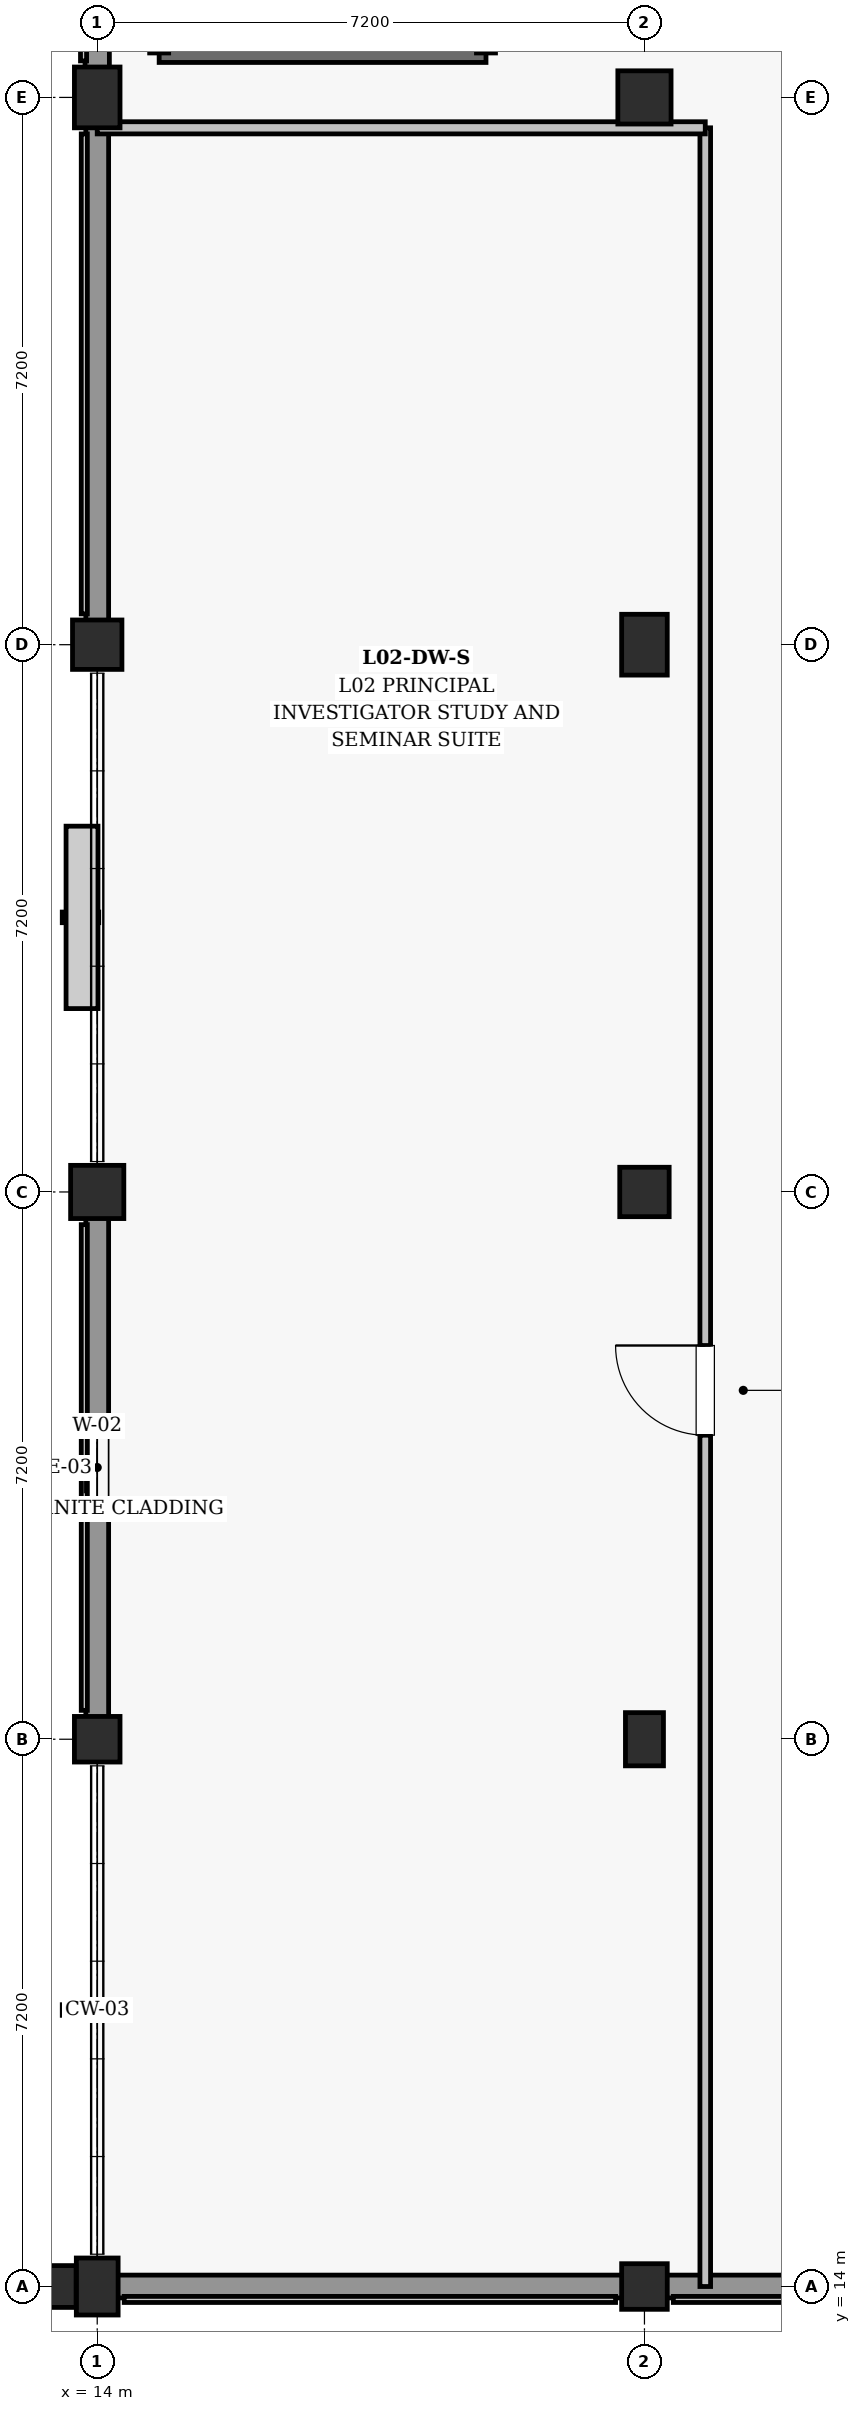
"""IFC4 building model, lengths in metres.
Left out: names, types, materials, properties, quantities, classifications, styles, units other than length and angle.
Written with IfcOpenShell. Run it as: python <this file> out.ifc"""

import sys

from ifc_helpers import new_model, si_unit, direction, frame, frame_2d, origin, origin_2d, place, context, subcontext, project, spatial, rectangle, extrude, element, fill, save


model = new_model("IFC4")
c1 = context("Model", 3, precision=1e-05, world=origin(), true_north=direction((0.0, 1.0)))
c2 = subcontext(c1, "Body", "Model", "MODEL_VIEW")
j1 = project(units=[si_unit("LENGTHUNIT", "METRE"), si_unit("PLANEANGLEUNIT", "RADIAN")], contexts=[c1])
p1 = place(None, origin())
s1 = spatial("IfcSite", under=j1, at=p1, CompositionType="ELEMENT")
p2 = place(p1, origin())
s2 = spatial("IfcBuilding", under=s1, at=p2, CompositionType="ELEMENT")
p3 = place(p2, frame((0.0, 0.0, 9.9)))
s3 = spatial("IfcBuildingStorey", under=s2, at=p3, CompositionType="ELEMENT", Elevation=9.9)
p4 = place(p3, frame((14.0, 14.0, 0.0), z_axis=(0.0, 0.0, 1.0), x_axis=(1.0, 0.0, 0.0)))
e1 = element("IfcColumn", 1, at=p4, inside=s3, PredefinedType="COLUMN", context=c2, shape_type="SweptSolid", body=[
    extrude(rectangle(XDim=0.55, YDim=0.75, at=origin_2d()), origin(), (0.0, 0.0, 1.0), 4.5),
])
p5 = place(p3, frame((14.0, 21.2, 0.0), z_axis=(0.0, 0.0, 1.0), x_axis=(1.0, 0.0, 0.0)))
e2 = element("IfcColumn", 2, at=p5, inside=s3, PredefinedType="COLUMN", context=c2, shape_type="SweptSolid", body=[
    extrude(rectangle(XDim=0.6, YDim=0.6, at=origin_2d()), origin(), (0.0, 0.0, 1.0), 4.5),
])
p6 = place(p3, frame((14.0, 28.4, 0.0), z_axis=(0.0, 0.0, 1.0), x_axis=(1.0, 0.0, 0.0)))
e3 = element("IfcColumn", 3, at=p6, inside=s3, PredefinedType="COLUMN", context=c2, shape_type="SweptSolid", body=[
    extrude(rectangle(XDim=0.7, YDim=0.7, at=origin_2d()), origin(), (0.0, 0.0, 1.0), 4.5),
])
p7 = place(p3, frame((14.0, 35.6, 0.0), z_axis=(0.0, 0.0, 1.0), x_axis=(1.0, 0.0, 0.0)))
e4 = element("IfcColumn", 4, at=p7, inside=s3, PredefinedType="COLUMN", context=c2, shape_type="SweptSolid", body=[
    extrude(rectangle(XDim=0.65, YDim=0.65, at=origin_2d()), origin(), (0.0, 0.0, 1.0), 4.5),
])
p8 = place(p3, frame((14.0, 42.8, 0.0), z_axis=(0.0, 0.0, 1.0), x_axis=(1.0, 0.0, 0.0)))
e5 = element("IfcColumn", 5, at=p8, inside=s3, PredefinedType="COLUMN", context=c2, shape_type="SweptSolid", body=[
    extrude(rectangle(XDim=0.6, YDim=0.8, at=origin_2d()), origin(), (0.0, 0.0, 1.0), 4.5),
])
p9 = place(p3, frame((21.2, 14.0, 0.0), z_axis=(0.0, 0.0, 1.0), x_axis=(1.0, 0.0, 0.0)))
e6 = element("IfcColumn", 6, at=p9, inside=s3, PredefinedType="COLUMN", context=c2, shape_type="SweptSolid", body=[
    extrude(rectangle(XDim=0.6, YDim=0.6, at=origin_2d()), origin(), (0.0, 0.0, 1.0), 4.5),
])
p10 = place(p3, frame((21.2, 21.2, 0.0), z_axis=(0.0, 0.0, 1.0), x_axis=(1.0, 0.0, 0.0)))
e7 = element("IfcColumn", 7, at=p10, inside=s3, PredefinedType="COLUMN", context=c2, shape_type="SweptSolid", body=[
    extrude(rectangle(XDim=0.5, YDim=0.7, at=origin_2d()), origin(), (0.0, 0.0, 1.0), 4.5),
])
p11 = place(p3, frame((21.2, 28.4, 0.0), z_axis=(0.0, 0.0, 1.0), x_axis=(1.0, 0.0, 0.0)))
e8 = element("IfcColumn", 8, at=p11, inside=s3, PredefinedType="COLUMN", context=c2, shape_type="SweptSolid", body=[
    extrude(rectangle(XDim=0.65, YDim=0.65, at=origin_2d()), origin(), (0.0, 0.0, 1.0), 4.5),
])
p12 = place(p3, frame((21.2, 35.6, 0.0), z_axis=(0.0, 0.0, 1.0), x_axis=(1.0, 0.0, 0.0)))
e9 = element("IfcColumn", 9, at=p12, inside=s3, PredefinedType="COLUMN", context=c2, shape_type="SweptSolid", body=[
    extrude(rectangle(XDim=0.6, YDim=0.8, at=origin_2d()), origin(), (0.0, 0.0, 1.0), 4.5),
])
p13 = place(p3, frame((21.2, 42.8, 0.0), z_axis=(0.0, 0.0, 1.0), x_axis=(1.0, 0.0, 0.0)))
e10 = element("IfcColumn", 10, at=p13, inside=s3, PredefinedType="COLUMN", context=c2, shape_type="SweptSolid", body=[
    extrude(rectangle(XDim=0.7, YDim=0.7, at=origin_2d()), origin(), (0.0, 0.0, 1.0), 4.5),
])
p14 = place(p3, frame((13.322, 14.0, 0.0), z_axis=(0.0, 0.0, 1.0), x_axis=(0.0, 1.0, 0.0)))
e11 = element("IfcColumn", 11, at=p14, inside=s3, PredefinedType="PILASTER", context=c2, shape_type="SweptSolid", body=[
    extrude(rectangle(XDim=0.55, YDim=0.8, at=origin_2d()), origin(), (0.0, 0.0, 1.0), 4.5),
])
p15 = place(p3, frame((14.0, 21.48, 0.0), z_axis=(0.0, 0.0, 1.0), x_axis=(0.0, 1.0, 0.0)))
e12 = element("IfcWall", 12, at=p15, inside=s3, PredefinedType="SOLIDWALL", context=c2, shape_type="SweptSolid", body=[
    extrude(rectangle(XDim=6.59, YDim=0.3, at=frame_2d((3.295, 0.0))), origin(), (0.0, 0.0, 1.0), 3.455),
])
p16 = place(p15, frame((2.795, 0.0, 0.95)))
e13 = element("IfcOpeningElement", 13, at=p16, cuts=e12, PredefinedType="OPENING", context=c2, shape_type="SweptSolid", body=[
    extrude(rectangle(XDim=1.0, YDim=2.2, at=frame_2d((0.5, 1.1))), frame((0.0, 0.16, 0.0), z_axis=(0.0, -1.0, 0.0), x_axis=(1.0, 0.0, 0.0)), (0.0, 0.0, 1.0), 0.32),
])
p17 = place(p3, frame((14.0, 35.905, 0.0), z_axis=(0.0, 0.0, 1.0), x_axis=(0.0, 1.0, 0.0)))
e14 = element("IfcWall", 14, at=p17, inside=s3, PredefinedType="SOLIDWALL", context=c2, shape_type="SweptSolid", body=[
    extrude(rectangle(XDim=6.515, YDim=0.3, at=frame_2d((3.257, 0.0))), origin(), (0.0, 0.0, 1.0), 3.375),
])
p18 = place(p3, frame((14.0, 43.18, 0.0), z_axis=(0.0, 0.0, 1.0), x_axis=(0.0, 1.0, 0.0)))
e15 = element("IfcWall", 15, at=p18, inside=s3, PredefinedType="SOLIDWALL", context=c2, shape_type="SweptSolid", body=[
    extrude(rectangle(XDim=6.515, YDim=0.32, at=frame_2d((3.258, 0.0))), origin(), (0.0, 0.0, 1.0), 3.375),
])
p19 = place(p3, frame((14.255, 14.0, 0.0), z_axis=(0.0, 0.0, 1.0), x_axis=(1.0, 0.0, 0.0)))
e16 = element("IfcWall", 16, at=p19, inside=s3, PredefinedType="SOLIDWALL", context=c2, shape_type="SweptSolid", body=[
    extrude(rectangle(XDim=6.665, YDim=0.3, at=frame_2d((3.333, 0.0))), origin(), (0.0, 0.0, 1.0), 3.575),
])
p20 = place(p3, frame((21.48, 14.0, 0.0), z_axis=(0.0, 0.0, 1.0), x_axis=(1.0, 0.0, 0.0)))
e17 = element("IfcWall", 17, at=p20, inside=s3, PredefinedType="SOLIDWALL", context=c2, shape_type="SweptSolid", body=[
    extrude(rectangle(XDim=6.69, YDim=0.3, at=frame_2d((3.345, 0.0))), origin(), (0.0, 0.0, 1.0), 3.475),
])
p21 = place(p3, frame((14.815, 43.385, 0.0), z_axis=(0.0, 0.0, 1.0), x_axis=(1.0, 0.0, 0.0)))
e18 = element("IfcWall", 18, at=p21, inside=s3, PredefinedType="SHEAR", context=c2, shape_type="SweptSolid", body=[
    extrude(rectangle(XDim=4.3, YDim=0.25, at=frame_2d((2.15, 0.0))), origin(), (0.0, 0.0, 1.0), 4.195),
])
p22 = place(p3, frame((19.115, 43.385, 0.0), z_axis=(0.0, 0.0, 1.0), x_axis=(0.0, 1.0, 0.0)))
e19 = element("IfcWall", 19, at=p22, inside=s3, PredefinedType="SHEAR", context=c2, shape_type="SweptSolid", body=[
    extrude(rectangle(XDim=10.63, YDim=0.25, at=frame_2d((5.315, 0.0))), origin(), (0.0, 0.0, 1.0), 4.195),
])
p23 = place(p22, frame((0.55, 0.0, 0.0)))
e20 = element("IfcOpeningElement", 20, at=p23, cuts=e19, PredefinedType="OPENING", context=c2, shape_type="SweptSolid", body=[
    extrude(rectangle(XDim=1.2, YDim=2.15, at=frame_2d((0.6, 1.075))), frame((0.0, 0.135, 0.0), z_axis=(0.0, -1.0, 0.0), x_axis=(1.0, 0.0, 0.0)), (0.0, 0.0, 1.0), 0.27),
])
p24 = place(p3, frame((14.815, 54.015, 0.0), z_axis=(0.0, 0.0, 1.0), x_axis=(0.0, -1.0, 0.0)))
e21 = element("IfcWall", 21, at=p24, inside=s3, PredefinedType="SHEAR", context=c2, shape_type="SweptSolid", body=[
    extrude(rectangle(XDim=10.63, YDim=0.25, at=frame_2d((5.315, 0.0))), origin(), (0.0, 0.0, 1.0), 4.195),
])
p25 = place(p3, frame((22.0, 14.0, 0.0), z_axis=(0.0, 0.0, 1.0), x_axis=(0.0, 1.0, 0.0)))
e22 = element("IfcWall", 22, at=p25, inside=s3, PredefinedType="PARTITIONING", context=c2, shape_type="SweptSolid", body=[
    extrude(rectangle(XDim=28.4, YDim=0.14, at=frame_2d((14.2, 0.0))), origin(), (0.0, 0.0, 1.0), 3.48),
])
p26 = place(p25, frame((11.2, 0.0, 0.0)))
e23 = element("IfcOpeningElement", 23, at=p26, cuts=e22, PredefinedType="OPENING", context=c2, shape_type="SweptSolid", body=[
    extrude(rectangle(XDim=1.18, YDim=2.2, at=frame_2d((0.59, 1.1))), frame((0.0, 0.08, 0.0), z_axis=(0.0, -1.0, 0.0), x_axis=(1.0, 0.0, 0.0)), (0.0, 0.0, 1.0), 0.16),
])
p27 = place(p3, frame((14.0, 42.4, 0.0), z_axis=(0.0, 0.0, 1.0), x_axis=(1.0, 0.0, 0.0)))
e24 = element("IfcWall", 24, at=p27, inside=s3, PredefinedType="PARTITIONING", context=c2, shape_type="SweptSolid", body=[
    extrude(rectangle(XDim=8.0, YDim=0.16, at=frame_2d((4.0, 0.0))), origin(), (0.0, 0.0, 1.0), 3.58),
])
p28 = place(p16, origin())
e25 = element("IfcWindow", 25, at=p28, inside=s3, PartitioningType="SINGLE_PANEL", PredefinedType="WINDOW", context=c2, shape_type="SweptSolid", body=[
    extrude(rectangle(XDim=1.0, YDim=2.2, at=frame_2d((0.5, 1.1))), frame((0.0, 0.03, 0.0), z_axis=(0.0, -1.0, 0.0), x_axis=(1.0, 0.0, 0.0)), (0.0, 0.0, 1.0), 0.06),
])
fill(e13, e25)
p29 = place(p26, origin())
e26 = element("IfcDoor", 26, at=p29, inside=s3, OperationType="SINGLE_SWING_RIGHT", PredefinedType="DOOR", context=c2, shape_type="SweptSolid", body=[
    extrude(rectangle(XDim=1.18, YDim=2.2, at=frame_2d((0.59, 1.1))), frame((0.0, 0.025, 0.0), z_axis=(0.0, -1.0, 0.0), x_axis=(1.0, 0.0, 0.0)), (0.0, 0.0, 1.0), 0.05),
])
fill(e23, e26)
save(model, sys.argv[1])
